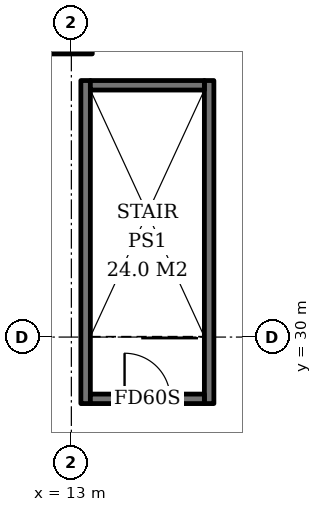
"""IFC4 building model, lengths in metres.
Left out: names, types, materials, properties, quantities, classifications, styles, units other than length and angle.
Written with IfcOpenShell. Run it as: python <this file> out.ifc"""

import sys

from ifc_helpers import new_model, si_unit, direction, frame, frame_2d, origin, origin_2d, place, context, subcontext, project, spatial, rectangle, extrude, element, fill, save


model = new_model("IFC4")
c1 = context("Model", 3, precision=1e-05, world=origin(), true_north=direction((0.0, 1.0)))
c2 = subcontext(c1, "Body", "Model", "MODEL_VIEW")
j1 = project(units=[si_unit("LENGTHUNIT", "METRE"), si_unit("PLANEANGLEUNIT", "RADIAN")], contexts=[c1])
p1 = place(None, origin())
s1 = spatial("IfcSite", under=j1, at=p1, CompositionType="ELEMENT")
p2 = place(p1, origin())
s2 = spatial("IfcBuilding", under=s1, at=p2, CompositionType="ELEMENT")
p3 = place(p2, frame((0.0, 0.0, 6.0)))
s3 = spatial("IfcBuildingStorey", under=s2, at=p3, CompositionType="ELEMENT", Elevation=6.0)
p4 = place(p3, frame((13.0, 38.0, 0.0), z_axis=(0.0, 0.0, 1.0), x_axis=(1.0, 0.0, 0.0)))
e1 = element("IfcColumn", 1, at=p4, inside=s3, PredefinedType="COLUMN", context=c2, shape_type="SweptSolid", body=[
    extrude(rectangle(XDim=1.1, YDim=1.1, at=origin_2d()), origin(), (0.0, 0.0, 1.0), 5.0),
])
for number, where, z_axis, x_axis in (
    (2, (13.375, 28.25, 0.0), (0.0, 0.0, 1.0), (0.0, 1.0, 0.0)),
    (3, (16.625, 28.25, 0.0), (0.0, 0.0, 1.0), (0.0, 1.0, 0.0)),
):
    element("IfcWall", number, at=place(p3, frame(where, z_axis=z_axis, x_axis=x_axis)), inside=s3, PredefinedType="SOLIDWALL", context=c2, shape_type="SweptSolid", body=[
        extrude(rectangle(XDim=8.5, YDim=0.25, at=frame_2d((4.25, 0.0))), origin(), (0.0, 0.0, 1.0), 4.7),
    ])
p5 = place(p3, frame((13.5, 28.375, 0.0), z_axis=(0.0, 0.0, 1.0), x_axis=(1.0, 0.0, 0.0)))
e4 = element("IfcWall", 4, at=p5, inside=s3, PredefinedType="SOLIDWALL", context=c2, shape_type="SweptSolid", body=[
    extrude(rectangle(XDim=3.0, YDim=0.25, at=frame_2d((1.5, 0.0))), origin(), (0.0, 0.0, 1.0), 4.7),
])
p6 = place(p5, frame((0.9, 0.0, 0.0)))
e5 = element("IfcOpeningElement", 5, at=p6, cuts=e4, PredefinedType="OPENING", context=c2, shape_type="SweptSolid", body=[
    extrude(rectangle(XDim=1.2, YDim=2.1, at=frame_2d((0.6, 1.05))), frame((0.0, 0.135, 0.0), z_axis=(0.0, -1.0, 0.0), x_axis=(1.0, 0.0, 0.0)), (0.0, 0.0, 1.0), 0.27),
])
p7 = place(p3, frame((13.5, 36.625, 0.0), z_axis=(0.0, 0.0, 1.0), x_axis=(1.0, 0.0, 0.0)))
e6 = element("IfcWall", 6, at=p7, inside=s3, PredefinedType="SOLIDWALL", context=c2, shape_type="SweptSolid", body=[
    extrude(rectangle(XDim=3.0, YDim=0.25, at=frame_2d((1.5, 0.0))), origin(), (0.0, 0.0, 1.0), 4.7),
])
p8 = place(p6, origin())
e7 = element("IfcDoor", 7, at=p8, inside=s3, OperationType="SINGLE_SWING_LEFT", PredefinedType="DOOR", context=c2, shape_type="SweptSolid", body=[
    extrude(rectangle(XDim=1.2, YDim=2.1, at=frame_2d((0.6, 1.05))), frame((0.0, 0.025, 0.0), z_axis=(0.0, -1.0, 0.0), x_axis=(1.0, 0.0, 0.0)), (0.0, 0.0, 1.0), 0.05),
])
fill(e5, e7)
save(model, sys.argv[1])
